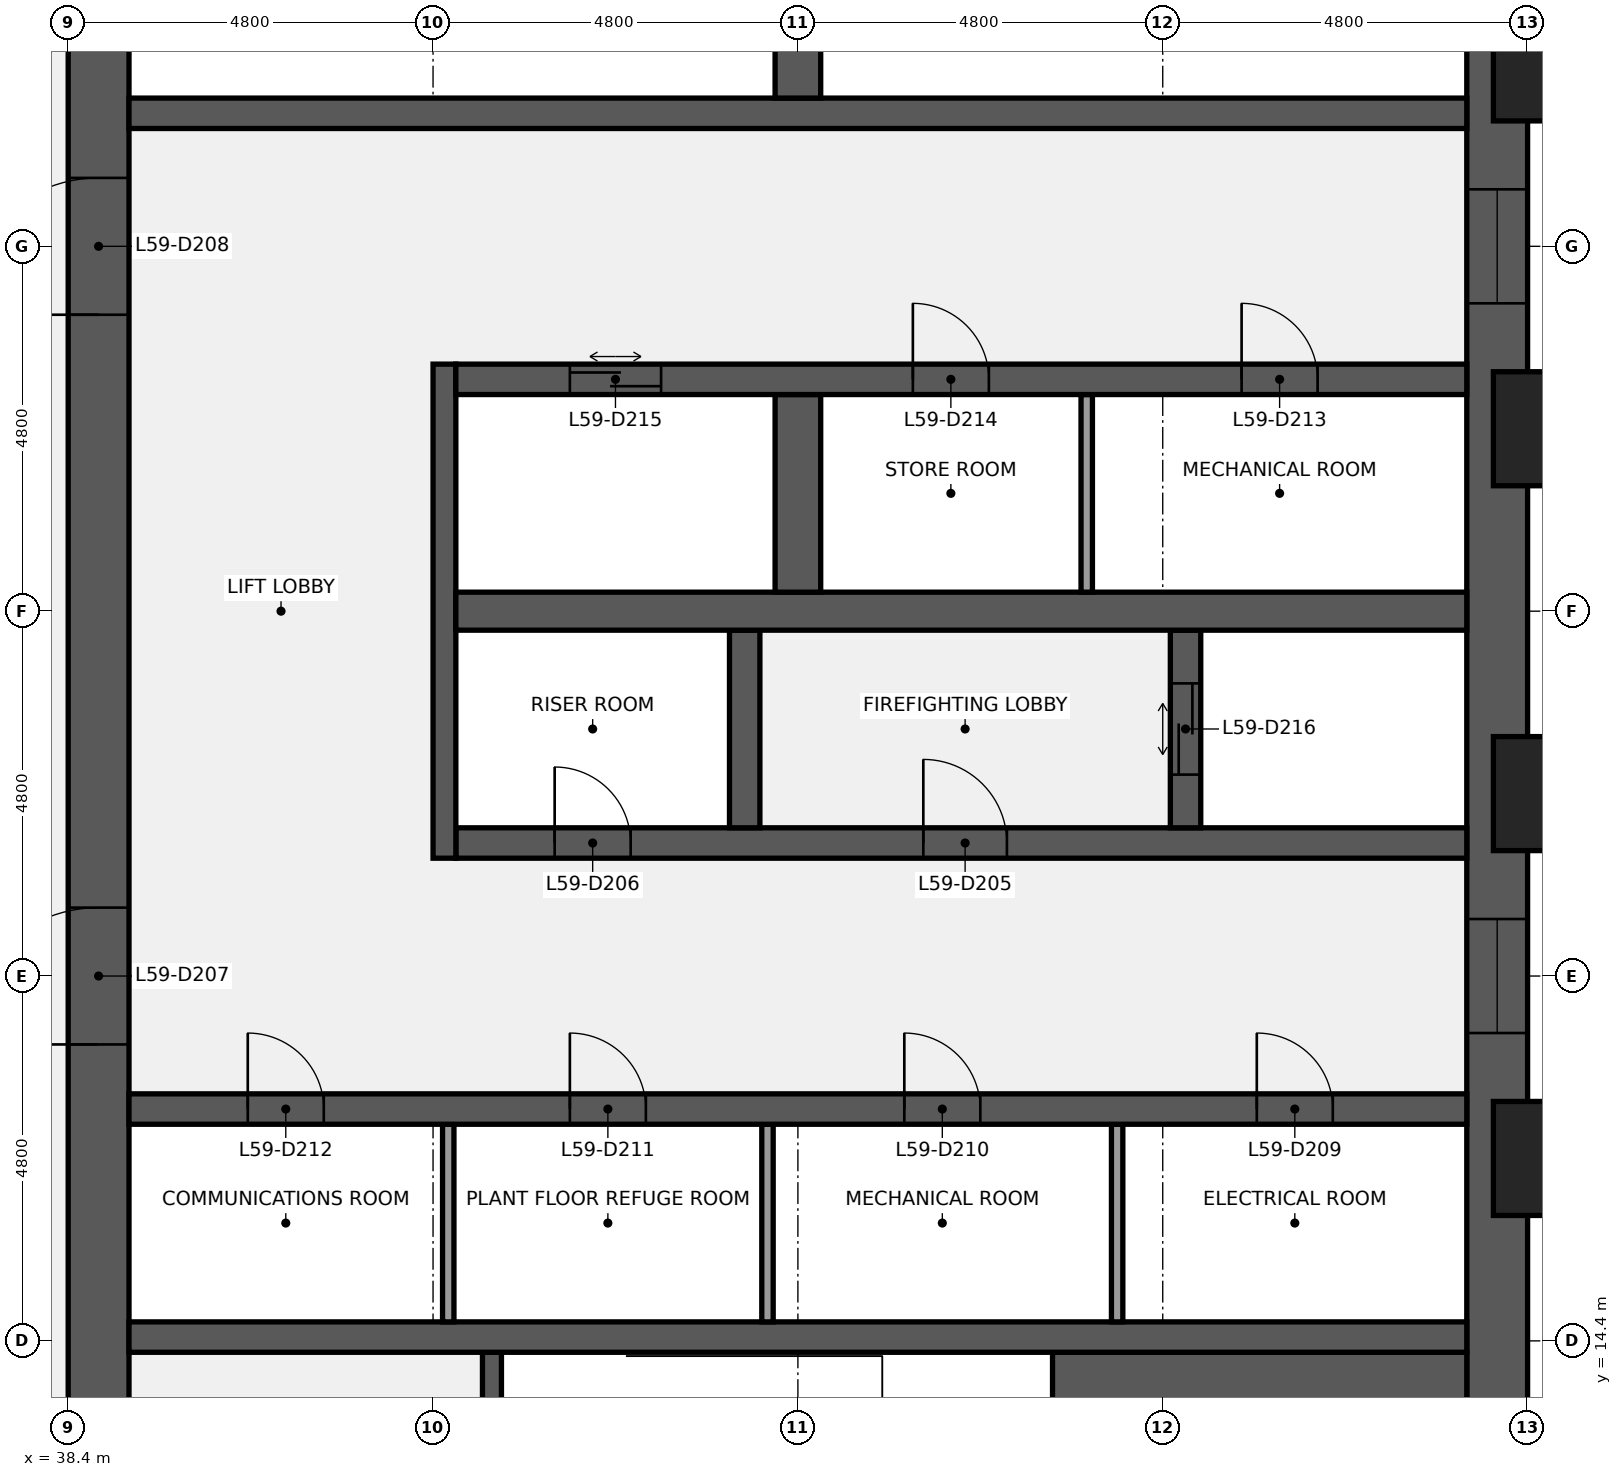
"""IFC4 building model, lengths in metres.
Left out: names, types, materials, properties, quantities, classifications, styles, units other than length and angle.
Written with IfcOpenShell. Run it as: python <this file> out.ifc"""

import sys

from ifc_helpers import new_model, si_unit, direction, frame, frame_2d, origin, origin_2d, place, context, subcontext, project, spatial, rectangle, extrude, element, fill, save


model = new_model("IFC4")
c1 = context("Model", 3, precision=1e-05, world=origin(), true_north=direction((0.0, 1.0)))
c2 = subcontext(c1, "Body", "Model", "MODEL_VIEW")
j1 = project(units=[si_unit("LENGTHUNIT", "METRE"), si_unit("PLANEANGLEUNIT", "RADIAN")], contexts=[c1])
p1 = place(None, origin())
s1 = spatial("IfcSite", under=j1, at=p1, CompositionType="ELEMENT")
p2 = place(p1, origin())
s2 = spatial("IfcBuilding", under=s1, at=p2, CompositionType="ELEMENT")
p3 = place(p2, frame((0.0, 0.0, 265.2)))
s3 = spatial("IfcBuildingStorey", under=s2, at=p3, CompositionType="ELEMENT", Elevation=265.2)
p4 = place(p3, frame((57.2, 38.4, 0.0), z_axis=(0.0, 0.0, 1.0), x_axis=(0.0, -1.0, 0.0)))
e1 = element("IfcWall", 1, at=p4, inside=s3, PredefinedType="SHEAR", context=c2, shape_type="SweptSolid", body=[
    extrude(rectangle(XDim=28.8, YDim=0.8, at=frame_2d((14.4, 0.0))), origin(), (0.0, 0.0, 1.0), 4.1),
])
p5 = place(p4, frame((18.45, 0.0, 0.9)))
e2 = element("IfcOpeningElement", 2, at=p5, cuts=e1, PredefinedType="OPENING", context=c2, shape_type="SweptSolid", body=[
    extrude(rectangle(XDim=1.5, YDim=1.5, at=frame_2d((0.75, 0.75))), frame((0.0, 0.41, 0.0), z_axis=(0.0, -1.0, 0.0), x_axis=(1.0, 0.0, 0.0)), (0.0, 0.0, 1.0), 0.82),
])
p6 = place(p4, frame((8.85, 0.0, 0.9)))
e3 = element("IfcOpeningElement", 3, at=p6, cuts=e1, PredefinedType="OPENING", context=c2, shape_type="SweptSolid", body=[
    extrude(rectangle(XDim=1.5, YDim=1.5, at=frame_2d((0.75, 0.75))), frame((0.0, 0.41, 0.0), z_axis=(0.0, -1.0, 0.0), x_axis=(1.0, 0.0, 0.0)), (0.0, 0.0, 1.0), 0.82),
])
p7 = place(p3, frame((38.8, 9.6, 0.0), z_axis=(0.0, 0.0, 1.0), x_axis=(0.0, 1.0, 0.0)))
e4 = element("IfcWall", 4, at=p7, inside=s3, PredefinedType="SHEAR", context=c2, shape_type="SweptSolid", body=[
    extrude(rectangle(XDim=28.8, YDim=0.8, at=frame_2d((14.4, 0.0))), origin(), (0.0, 0.0, 1.0), 4.1),
])
p8 = place(p7, frame((8.7, 0.0, 0.0)))
e5 = element("IfcOpeningElement", 5, at=p8, cuts=e4, PredefinedType="OPENING", context=c2, shape_type="SweptSolid", body=[
    extrude(rectangle(XDim=1.8, YDim=2.1, at=frame_2d((0.9, 1.05))), frame((0.0, 0.41, 0.0), z_axis=(0.0, -1.0, 0.0), x_axis=(1.0, 0.0, 0.0)), (0.0, 0.0, 1.0), 0.82),
])
p9 = place(p7, frame((18.3, 0.0, 0.0)))
e6 = element("IfcOpeningElement", 6, at=p9, cuts=e4, PredefinedType="OPENING", context=c2, shape_type="SweptSolid", body=[
    extrude(rectangle(XDim=1.8, YDim=2.1, at=frame_2d((0.9, 1.05))), frame((0.0, 0.41, 0.0), z_axis=(0.0, -1.0, 0.0), x_axis=(1.0, 0.0, 0.0)), (0.0, 0.0, 1.0), 0.82),
])
p10 = place(p3, frame((51.35, 12.325, 0.0), z_axis=(0.0, 0.0, 1.0), x_axis=(1.0, 0.0, 0.0)))
e7 = element("IfcWall", 7, at=p10, inside=s3, PredefinedType="SHEAR", context=c2, shape_type="SweptSolid", body=[
    extrude(rectangle(XDim=5.45, YDim=3.85, at=frame_2d((2.725, 0.0))), origin(), (0.0, 0.0, 1.0), 4.1),
])
p11 = place(p3, frame((43.975, 10.8, 0.0), z_axis=(0.0, 0.0, 1.0), x_axis=(0.0, 1.0, 0.0)))
e8 = element("IfcWall", 8, at=p11, inside=s3, PredefinedType="SHEAR", context=c2, shape_type="SweptSolid", body=[
    extrude(rectangle(XDim=3.45, YDim=0.25, at=frame_2d((1.725, 0.0))), origin(), (0.0, 0.0, 1.0), 4.1),
])
p12 = place(p11, frame((1.175, 0.0, 0.0)))
e9 = element("IfcOpeningElement", 9, at=p12, cuts=e8, PredefinedType="OPENING", context=c2, shape_type="SweptSolid", body=[
    extrude(rectangle(XDim=1.1, YDim=2.1, at=frame_2d((0.55, 1.05))), frame((0.0, 0.135, 0.0), z_axis=(0.0, -1.0, 0.0), x_axis=(1.0, 0.0, 0.0)), (0.0, 0.0, 1.0), 0.27),
])
p13 = place(p3, frame((39.2, 14.45, 0.0), z_axis=(0.0, 0.0, 1.0), x_axis=(1.0, 0.0, 0.0)))
e10 = element("IfcWall", 10, at=p13, inside=s3, PredefinedType="SHEAR", context=c2, shape_type="SweptSolid", body=[
    extrude(rectangle(XDim=17.6, YDim=0.4, at=frame_2d((8.8, 0.0))), origin(), (0.0, 0.0, 1.0), 4.1),
])
for number, where, z_axis, x_axis in (
    (11, (52.2, 14.65, 0.0), (0.0, 0.0, 1.0), (0.0, 1.0, 0.0)),
    (12, (47.6, 14.65, 0.0), (0.0, 0.0, 1.0), (0.0, 1.0, 0.0)),
    (13, (43.4, 14.65, 0.0), (0.0, 0.0, 1.0), (0.0, 1.0, 0.0)),
):
    element("IfcWall", number, at=place(p3, frame(where, z_axis=z_axis, x_axis=x_axis)), inside=s3, PredefinedType="PARTITIONING", context=c2, shape_type="SweptSolid", body=[
        extrude(rectangle(XDim=2.6, YDim=0.15, at=frame_2d((1.3, 0.0))), origin(), (0.0, 0.0, 1.0), 4.1),
    ])
p14 = place(p3, frame((39.2, 17.45, 0.0), z_axis=(0.0, 0.0, 1.0), x_axis=(1.0, 0.0, 0.0)))
e14 = element("IfcWall", 14, at=p14, inside=s3, PredefinedType="SHEAR", context=c2, shape_type="SweptSolid", body=[
    extrude(rectangle(XDim=17.6, YDim=0.4, at=frame_2d((8.8, 0.0))), origin(), (0.0, 0.0, 1.0), 4.1),
])
p15 = place(p14, frame((14.837, 0.0, 0.0)))
e15 = element("IfcOpeningElement", 15, at=p15, cuts=e14, PredefinedType="OPENING", context=c2, shape_type="SweptSolid", body=[
    extrude(rectangle(XDim=1.0, YDim=2.1, at=frame_2d((0.5, 1.05))), frame((0.0, 0.21, 0.0), z_axis=(0.0, -1.0, 0.0), x_axis=(1.0, 0.0, 0.0)), (0.0, 0.0, 1.0), 0.42),
])
p16 = place(p14, frame((10.2, 0.0, 0.0)))
e16 = element("IfcOpeningElement", 16, at=p16, cuts=e14, PredefinedType="OPENING", context=c2, shape_type="SweptSolid", body=[
    extrude(rectangle(XDim=1.0, YDim=2.1, at=frame_2d((0.5, 1.05))), frame((0.0, 0.21, 0.0), z_axis=(0.0, -1.0, 0.0), x_axis=(1.0, 0.0, 0.0)), (0.0, 0.0, 1.0), 0.42),
])
p17 = place(p14, frame((5.8, 0.0, 0.0)))
e17 = element("IfcOpeningElement", 17, at=p17, cuts=e14, PredefinedType="OPENING", context=c2, shape_type="SweptSolid", body=[
    extrude(rectangle(XDim=1.0, YDim=2.1, at=frame_2d((0.5, 1.05))), frame((0.0, 0.21, 0.0), z_axis=(0.0, -1.0, 0.0), x_axis=(1.0, 0.0, 0.0)), (0.0, 0.0, 1.0), 0.42),
])
p18 = place(p14, frame((1.562, 0.0, 0.0)))
e18 = element("IfcOpeningElement", 18, at=p18, cuts=e14, PredefinedType="OPENING", context=c2, shape_type="SweptSolid", body=[
    extrude(rectangle(XDim=1.0, YDim=2.1, at=frame_2d((0.5, 1.05))), frame((0.0, 0.21, 0.0), z_axis=(0.0, -1.0, 0.0), x_axis=(1.0, 0.0, 0.0)), (0.0, 0.0, 1.0), 0.42),
])
p19 = place(p3, frame((43.5, 20.95, 0.0), z_axis=(0.0, 0.0, 1.0), x_axis=(1.0, 0.0, 0.0)))
e19 = element("IfcWall", 19, at=p19, inside=s3, PredefinedType="SHEAR", context=c2, shape_type="SweptSolid", body=[
    extrude(rectangle(XDim=13.3, YDim=0.4, at=frame_2d((6.65, 0.0))), origin(), (0.0, 0.0, 1.0), 4.1),
])
p20 = place(p19, frame((6.15, 0.0, 0.0)))
e20 = element("IfcOpeningElement", 20, at=p20, cuts=e19, PredefinedType="OPENING", context=c2, shape_type="SweptSolid", body=[
    extrude(rectangle(XDim=1.1, YDim=2.1, at=frame_2d((0.55, 1.05))), frame((0.0, 0.21, 0.0), z_axis=(0.0, -1.0, 0.0), x_axis=(1.0, 0.0, 0.0)), (0.0, 0.0, 1.0), 0.42),
])
p21 = place(p19, frame((1.3, 0.0, 0.0)))
e21 = element("IfcOpeningElement", 21, at=p21, cuts=e19, PredefinedType="OPENING", context=c2, shape_type="SweptSolid", body=[
    extrude(rectangle(XDim=1.0, YDim=2.1, at=frame_2d((0.5, 1.05))), frame((0.0, 0.21, 0.0), z_axis=(0.0, -1.0, 0.0), x_axis=(1.0, 0.0, 0.0)), (0.0, 0.0, 1.0), 0.42),
])
p22 = place(p3, frame((43.35, 20.75, 0.0), z_axis=(0.0, 0.0, 1.0), x_axis=(0.0, 1.0, 0.0)))
e22 = element("IfcWall", 22, at=p22, inside=s3, PredefinedType="SHEAR", context=c2, shape_type="SweptSolid", body=[
    extrude(rectangle(XDim=6.5, YDim=0.3, at=frame_2d((3.25, 0.0))), origin(), (0.0, 0.0, 1.0), 4.1),
])
p23 = place(p3, frame((53.1, 21.15, 0.0), z_axis=(0.0, 0.0, 1.0), x_axis=(0.0, 1.0, 0.0)))
e23 = element("IfcWall", 23, at=p23, inside=s3, PredefinedType="SHEAR", context=c2, shape_type="SweptSolid", body=[
    extrude(rectangle(XDim=2.6, YDim=0.4, at=frame_2d((1.3, 0.0))), origin(), (0.0, 0.0, 1.0), 4.1),
])
p24 = place(p23, frame((0.7, 0.0, 0.0)))
e24 = element("IfcOpeningElement", 24, at=p24, cuts=e23, PredefinedType="OPENING", context=c2, shape_type="SweptSolid", body=[
    extrude(rectangle(XDim=1.2, YDim=2.1, at=frame_2d((0.6, 1.05))), frame((0.0, 0.21, 0.0), z_axis=(0.0, -1.0, 0.0), x_axis=(1.0, 0.0, 0.0)), (0.0, 0.0, 1.0), 0.42),
])
p25 = place(p3, frame((47.3, 21.15, 0.0), z_axis=(0.0, 0.0, 1.0), x_axis=(0.0, 1.0, 0.0)))
e25 = element("IfcWall", 25, at=p25, inside=s3, PredefinedType="SHEAR", context=c2, shape_type="SweptSolid", body=[
    extrude(rectangle(XDim=2.6, YDim=0.4, at=frame_2d((1.3, 0.0))), origin(), (0.0, 0.0, 1.0), 4.1),
])
p26 = place(p3, frame((43.5, 24.0, 0.0), z_axis=(0.0, 0.0, 1.0), x_axis=(1.0, 0.0, 0.0)))
e26 = element("IfcWall", 26, at=p26, inside=s3, PredefinedType="SHEAR", context=c2, shape_type="SweptSolid", body=[
    extrude(rectangle(XDim=13.3, YDim=0.5, at=frame_2d((6.65, 0.0))), origin(), (0.0, 0.0, 1.0), 4.1),
])
p27 = place(p3, frame((51.8, 24.25, 0.0), z_axis=(0.0, 0.0, 1.0), x_axis=(0.0, 1.0, 0.0)))
e27 = element("IfcWall", 27, at=p27, inside=s3, PredefinedType="PARTITIONING", context=c2, shape_type="SweptSolid", body=[
    extrude(rectangle(XDim=2.6, YDim=0.15, at=frame_2d((1.3, 0.0))), origin(), (0.0, 0.0, 1.0), 4.1),
])
p28 = place(p3, frame((48.0, 24.25, 0.0), z_axis=(0.0, 0.0, 1.0), x_axis=(0.0, 1.0, 0.0)))
e28 = element("IfcWall", 28, at=p28, inside=s3, PredefinedType="SHEAR", context=c2, shape_type="SweptSolid", body=[
    extrude(rectangle(XDim=2.6, YDim=0.6, at=frame_2d((1.3, 0.0))), origin(), (0.0, 0.0, 1.0), 4.1),
])
p29 = place(p3, frame((43.5, 27.05, 0.0), z_axis=(0.0, 0.0, 1.0), x_axis=(1.0, 0.0, 0.0)))
e29 = element("IfcWall", 29, at=p29, inside=s3, PredefinedType="SHEAR", context=c2, shape_type="SweptSolid", body=[
    extrude(rectangle(XDim=13.3, YDim=0.4, at=frame_2d((6.65, 0.0))), origin(), (0.0, 0.0, 1.0), 4.1),
])
p30 = place(p29, frame((10.337, 0.0, 0.0)))
e30 = element("IfcOpeningElement", 30, at=p30, cuts=e29, PredefinedType="OPENING", context=c2, shape_type="SweptSolid", body=[
    extrude(rectangle(XDim=1.0, YDim=2.1, at=frame_2d((0.5, 1.05))), frame((0.0, 0.21, 0.0), z_axis=(0.0, -1.0, 0.0), x_axis=(1.0, 0.0, 0.0)), (0.0, 0.0, 1.0), 0.42),
])
p31 = place(p29, frame((6.012, 0.0, 0.0)))
e31 = element("IfcOpeningElement", 31, at=p31, cuts=e29, PredefinedType="OPENING", context=c2, shape_type="SweptSolid", body=[
    extrude(rectangle(XDim=1.0, YDim=2.1, at=frame_2d((0.5, 1.05))), frame((0.0, 0.21, 0.0), z_axis=(0.0, -1.0, 0.0), x_axis=(1.0, 0.0, 0.0)), (0.0, 0.0, 1.0), 0.42),
])
p32 = place(p29, frame((1.5, 0.0, 0.0)))
e32 = element("IfcOpeningElement", 32, at=p32, cuts=e29, PredefinedType="OPENING", context=c2, shape_type="SweptSolid", body=[
    extrude(rectangle(XDim=1.2, YDim=2.1, at=frame_2d((0.6, 1.05))), frame((0.0, 0.21, 0.0), z_axis=(0.0, -1.0, 0.0), x_axis=(1.0, 0.0, 0.0)), (0.0, 0.0, 1.0), 0.42),
])
p33 = place(p3, frame((39.2, 30.55, 0.0), z_axis=(0.0, 0.0, 1.0), x_axis=(1.0, 0.0, 0.0)))
e33 = element("IfcWall", 33, at=p33, inside=s3, PredefinedType="SHEAR", context=c2, shape_type="SweptSolid", body=[
    extrude(rectangle(XDim=17.6, YDim=0.4, at=frame_2d((8.8, 0.0))), origin(), (0.0, 0.0, 1.0), 4.1),
])
p34 = place(p3, frame((48.0, 30.75, 0.0), z_axis=(0.0, 0.0, 1.0), x_axis=(0.0, 1.0, 0.0)))
e34 = element("IfcWall", 34, at=p34, inside=s3, PredefinedType="SHEAR", context=c2, shape_type="SweptSolid", body=[
    extrude(rectangle(XDim=2.6, YDim=0.6, at=frame_2d((1.3, 0.0))), origin(), (0.0, 0.0, 1.0), 4.1),
])
for number, where, z_axis, x_axis in (
    (35, (58.35, 16.8, 0.0), (0.0, 0.0, 1.0), (0.0, 1.0, 0.0)),
    (36, (58.35, 21.6, 0.0), (0.0, 0.0, 1.0), (0.0, 1.0, 0.0)),
    (37, (58.35, 26.4, 0.0), (0.0, 0.0, 1.0), (0.0, 1.0, 0.0)),
    (38, (58.35, 31.2, 0.0), (0.0, 0.0, 1.0), (0.0, 1.0, 0.0)),
):
    element("IfcColumn", number, at=place(p3, frame(where, z_axis=z_axis, x_axis=x_axis)), inside=s3, PredefinedType="PILASTER", context=c2, shape_type="SweptSolid", body=[
        extrude(rectangle(XDim=2.4, YDim=1.5, at=origin_2d()), origin(), (0.0, 0.0, 1.0), 4.5),
    ])
p35 = place(p20, origin())
e39 = element("IfcDoor", 39, at=p35, inside=s3, OperationType="SINGLE_SWING_LEFT", PredefinedType="DOOR", context=c2, shape_type="SweptSolid", body=[
    extrude(rectangle(XDim=1.1, YDim=2.1, at=frame_2d((0.55, 1.05))), frame((0.0, 0.025, 0.0), z_axis=(0.0, -1.0, 0.0), x_axis=(1.0, 0.0, 0.0)), (0.0, 0.0, 1.0), 0.05),
])
fill(e20, e39)
p36 = place(p21, origin())
e40 = element("IfcDoor", 40, at=p36, inside=s3, OperationType="SINGLE_SWING_LEFT", PredefinedType="DOOR", context=c2, shape_type="SweptSolid", body=[
    extrude(rectangle(XDim=1.0, YDim=2.1, at=frame_2d((0.5, 1.05))), frame((0.0, 0.025, 0.0), z_axis=(0.0, -1.0, 0.0), x_axis=(1.0, 0.0, 0.0)), (0.0, 0.0, 1.0), 0.05),
])
fill(e21, e40)
p37 = place(p8, origin())
e41 = element("IfcDoor", 41, at=p37, inside=s3, OperationType="DOUBLE_DOOR_SINGLE_SWING", PredefinedType="DOOR", context=c2, shape_type="SweptSolid", body=[
    extrude(rectangle(XDim=1.8, YDim=2.1, at=frame_2d((0.9, 1.05))), frame((0.0, 0.025, 0.0), z_axis=(0.0, -1.0, 0.0), x_axis=(1.0, 0.0, 0.0)), (0.0, 0.0, 1.0), 0.05),
])
fill(e5, e41)
p38 = place(p9, origin())
e42 = element("IfcDoor", 42, at=p38, inside=s3, OperationType="DOUBLE_DOOR_SINGLE_SWING", PredefinedType="DOOR", context=c2, shape_type="SweptSolid", body=[
    extrude(rectangle(XDim=1.8, YDim=2.1, at=frame_2d((0.9, 1.05))), frame((0.0, 0.025, 0.0), z_axis=(0.0, -1.0, 0.0), x_axis=(1.0, 0.0, 0.0)), (0.0, 0.0, 1.0), 0.05),
])
fill(e6, e42)
p39 = place(p15, origin())
e43 = element("IfcDoor", 43, at=p39, inside=s3, OperationType="SINGLE_SWING_LEFT", PredefinedType="DOOR", context=c2, shape_type="SweptSolid", body=[
    extrude(rectangle(XDim=1.0, YDim=2.1, at=frame_2d((0.5, 1.05))), frame((0.0, 0.025, 0.0), z_axis=(0.0, -1.0, 0.0), x_axis=(1.0, 0.0, 0.0)), (0.0, 0.0, 1.0), 0.05),
])
fill(e15, e43)
p40 = place(p16, origin())
e44 = element("IfcDoor", 44, at=p40, inside=s3, OperationType="SINGLE_SWING_LEFT", PredefinedType="DOOR", context=c2, shape_type="SweptSolid", body=[
    extrude(rectangle(XDim=1.0, YDim=2.1, at=frame_2d((0.5, 1.05))), frame((0.0, 0.025, 0.0), z_axis=(0.0, -1.0, 0.0), x_axis=(1.0, 0.0, 0.0)), (0.0, 0.0, 1.0), 0.05),
])
fill(e16, e44)
p41 = place(p17, origin())
e45 = element("IfcDoor", 45, at=p41, inside=s3, OperationType="SINGLE_SWING_LEFT", PredefinedType="DOOR", context=c2, shape_type="SweptSolid", body=[
    extrude(rectangle(XDim=1.0, YDim=2.1, at=frame_2d((0.5, 1.05))), frame((0.0, 0.025, 0.0), z_axis=(0.0, -1.0, 0.0), x_axis=(1.0, 0.0, 0.0)), (0.0, 0.0, 1.0), 0.05),
])
fill(e17, e45)
p42 = place(p18, origin())
e46 = element("IfcDoor", 46, at=p42, inside=s3, OperationType="SINGLE_SWING_LEFT", PredefinedType="DOOR", context=c2, shape_type="SweptSolid", body=[
    extrude(rectangle(XDim=1.0, YDim=2.1, at=frame_2d((0.5, 1.05))), frame((0.0, 0.025, 0.0), z_axis=(0.0, -1.0, 0.0), x_axis=(1.0, 0.0, 0.0)), (0.0, 0.0, 1.0), 0.05),
])
fill(e18, e46)
p43 = place(p30, origin())
e47 = element("IfcDoor", 47, at=p43, inside=s3, OperationType="SINGLE_SWING_LEFT", PredefinedType="DOOR", context=c2, shape_type="SweptSolid", body=[
    extrude(rectangle(XDim=1.0, YDim=2.1, at=frame_2d((0.5, 1.05))), frame((0.0, 0.025, 0.0), z_axis=(0.0, -1.0, 0.0), x_axis=(1.0, 0.0, 0.0)), (0.0, 0.0, 1.0), 0.05),
])
fill(e30, e47)
p44 = place(p31, origin())
e48 = element("IfcDoor", 48, at=p44, inside=s3, OperationType="SINGLE_SWING_LEFT", PredefinedType="DOOR", context=c2, shape_type="SweptSolid", body=[
    extrude(rectangle(XDim=1.0, YDim=2.1, at=frame_2d((0.5, 1.05))), frame((0.0, 0.025, 0.0), z_axis=(0.0, -1.0, 0.0), x_axis=(1.0, 0.0, 0.0)), (0.0, 0.0, 1.0), 0.05),
])
fill(e31, e48)
p45 = place(p32, origin())
e49 = element("IfcDoor", 49, at=p45, inside=s3, OperationType="DOUBLE_DOOR_SLIDING", PredefinedType="DOOR", context=c2, shape_type="SweptSolid", body=[
    extrude(rectangle(XDim=1.2, YDim=2.1, at=frame_2d((0.6, 1.05))), frame((0.0, 0.025, 0.0), z_axis=(0.0, -1.0, 0.0), x_axis=(1.0, 0.0, 0.0)), (0.0, 0.0, 1.0), 0.05),
])
fill(e32, e49)
p46 = place(p24, origin())
e50 = element("IfcDoor", 50, at=p46, inside=s3, OperationType="DOUBLE_DOOR_SLIDING", PredefinedType="DOOR", context=c2, shape_type="SweptSolid", body=[
    extrude(rectangle(XDim=1.2, YDim=2.1, at=frame_2d((0.6, 1.05))), frame((0.0, 0.025, 0.0), z_axis=(0.0, -1.0, 0.0), x_axis=(1.0, 0.0, 0.0)), (0.0, 0.0, 1.0), 0.05),
])
fill(e24, e50)
p47 = place(p5, origin())
e51 = element("IfcWindow", 51, at=p47, inside=s3, PartitioningType="SINGLE_PANEL", PredefinedType="WINDOW", context=c2, shape_type="SweptSolid", body=[
    extrude(rectangle(XDim=1.5, YDim=1.5, at=frame_2d((0.75, 0.75))), frame((0.0, 0.03, 0.0), z_axis=(0.0, -1.0, 0.0), x_axis=(1.0, 0.0, 0.0)), (0.0, 0.0, 1.0), 0.06),
])
fill(e2, e51)
p48 = place(p6, origin())
e52 = element("IfcWindow", 52, at=p48, inside=s3, PartitioningType="SINGLE_PANEL", PredefinedType="WINDOW", context=c2, shape_type="SweptSolid", body=[
    extrude(rectangle(XDim=1.5, YDim=1.5, at=frame_2d((0.75, 0.75))), frame((0.0, 0.03, 0.0), z_axis=(0.0, -1.0, 0.0), x_axis=(1.0, 0.0, 0.0)), (0.0, 0.0, 1.0), 0.06),
])
fill(e3, e52)
save(model, sys.argv[1])
